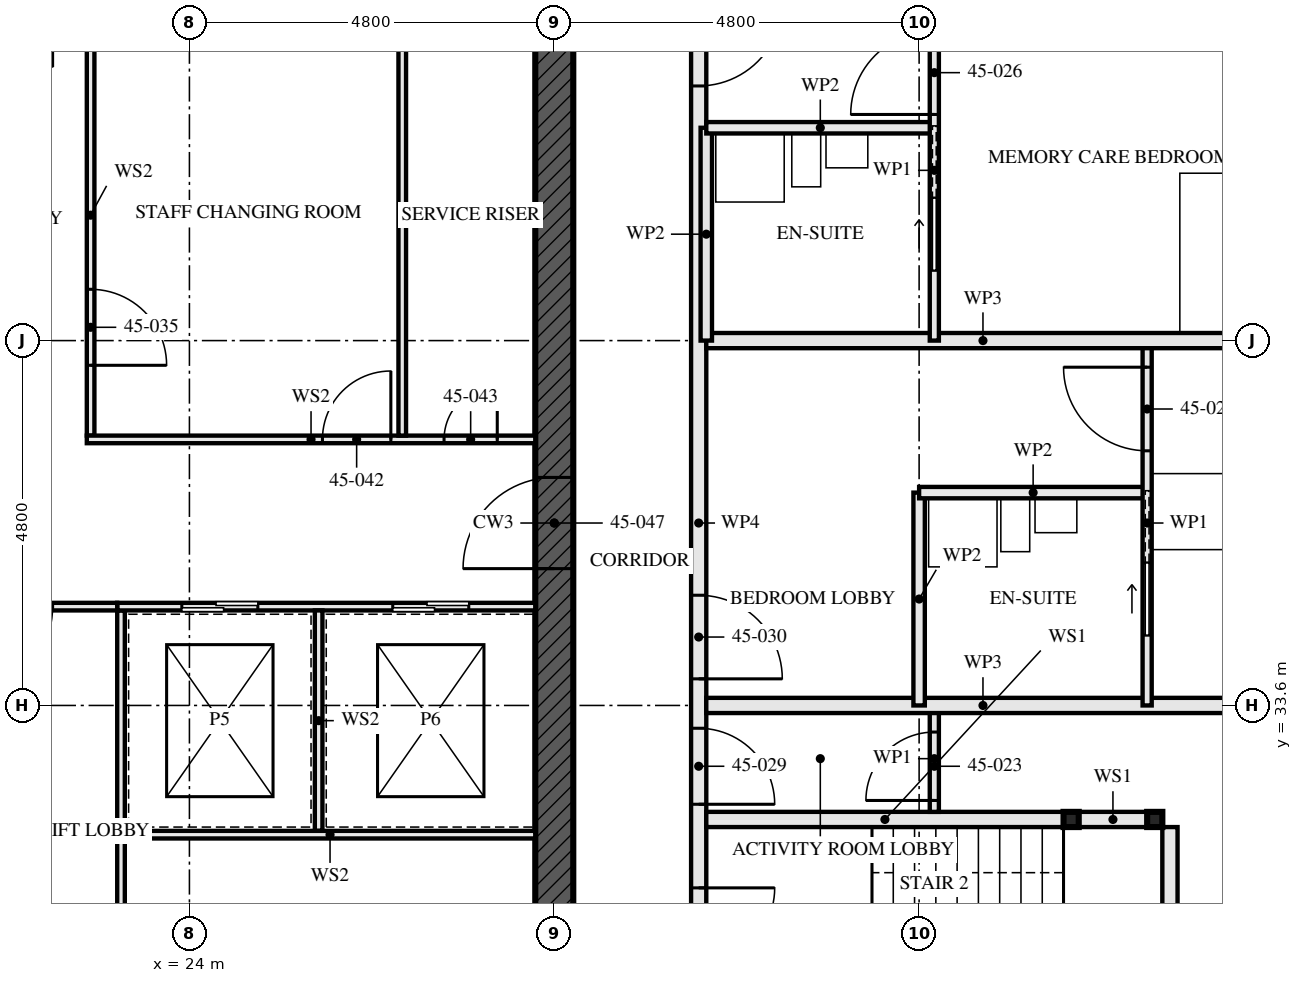
"""IFC4 building model, lengths in metres.
Left out: names, types, materials, properties, quantities, classifications, styles, units other than length and angle.
Written with IfcOpenShell. Run it as: python <this file> out.ifc"""

import sys

from ifc_helpers import new_model, si_unit, direction, frame, frame_2d, origin, origin_2d, place, context, subcontext, project, spatial, rectangle, hollow_rectangle, extrude, element, fill, save


model = new_model("IFC4")
c1 = context("Model", 3, precision=1e-05, world=origin(), true_north=direction((0.0, 1.0)))
c2 = subcontext(c1, "Body", "Model", "MODEL_VIEW")
j1 = project(units=[si_unit("LENGTHUNIT", "METRE"), si_unit("PLANEANGLEUNIT", "RADIAN")], contexts=[c1])
p1 = place(None, origin())
s1 = spatial("IfcSite", under=j1, at=p1, CompositionType="ELEMENT")
p2 = place(p1, origin())
s2 = spatial("IfcBuilding", under=s1, at=p2, CompositionType="ELEMENT")
p3 = place(p2, frame((0.0, 0.0, 165.5)))
s3 = spatial("IfcBuildingStorey", under=s2, at=p3, CompositionType="ELEMENT", Elevation=165.5)
p4 = place(p3, frame((28.8, 29.05, -0.17), z_axis=(0.0, 0.0, 1.0), x_axis=(0.0, 1.0, 0.0)))
e1 = element("IfcWall", 1, at=p4, inside=s3, PredefinedType="SHEAR", context=c2, shape_type="SweptSolid", body=[
    extrude(rectangle(XDim=13.9, YDim=0.5, at=frame_2d((6.95, 0.0))), origin(), (0.0, 0.0, 1.0), 3.5),
])
p5 = place(p4, frame((6.35, 0.0, 0.17)))
e2 = element("IfcOpeningElement", 2, at=p5, cuts=e1, PredefinedType="OPENING", context=c2, shape_type="SweptSolid", body=[
    extrude(rectangle(XDim=1.2, YDim=2.1, at=frame_2d((0.6, 1.05))), frame((0.0, 0.26, 0.0), z_axis=(0.0, -1.0, 0.0), x_axis=(1.0, 0.0, 0.0)), (0.0, 0.0, 1.0), 0.521),
])
for number, where, z_axis, x_axis in (
    (3, (36.7, 32.1, 0.0), (0.0, 0.0, 1.0), (1.0, 0.0, 0.0)),
    (4, (35.6, 32.1, 0.0), (0.0, 0.0, 1.0), (1.0, 0.0, 0.0)),
):
    element("IfcColumn", number, at=place(p3, frame(where, z_axis=z_axis, x_axis=x_axis)), inside=s3, PredefinedType="COLUMN", context=c2, shape_type="SweptSolid", body=[
        extrude(hollow_rectangle(XDim=0.2, YDim=0.2, WallThickness=0.008, at=origin_2d()), origin(), (0.0, 0.0, 1.0), 3.33),
    ])
p6 = place(p3, frame((36.6, 32.1, 0.0), z_axis=(0.0, 0.0, 1.0), x_axis=(-1.0, 0.0, 0.0)))
e5 = element("IfcWall", 5, at=p6, inside=s3, PredefinedType="SOLIDWALL", context=c2, shape_type="SweptSolid", body=[
    extrude(rectangle(XDim=0.9, YDim=0.2, at=frame_2d((0.45, 0.0))), origin(), (0.0, 0.0, 1.0), 2.99),
])
p7 = place(p3, frame((35.5, 32.1, 0.0), z_axis=(0.0, 0.0, 1.0), x_axis=(-1.0, 0.0, 0.0)))
e6 = element("IfcWall", 6, at=p7, inside=s3, PredefinedType="SOLIDWALL", context=c2, shape_type="SweptSolid", body=[
    extrude(rectangle(XDim=4.7, YDim=0.2, at=frame_2d((2.35, 0.0))), origin(), (0.0, 0.0, 1.0), 2.99),
])
p8 = place(p3, frame((36.9, 29.4, 0.0), z_axis=(0.0, 0.0, 1.0), x_axis=(0.0, 1.0, 0.0)))
e7 = element("IfcWall", 7, at=p8, inside=s3, PredefinedType="SOLIDWALL", context=c2, shape_type="SweptSolid", body=[
    extrude(rectangle(XDim=2.6, YDim=0.2, at=frame_2d((1.3, 0.0))), origin(), (0.0, 0.0, 1.0), 3.33),
])
p9 = place(p3, frame((33.8, 32.2, 0.0), z_axis=(0.0, 0.0, 1.0), x_axis=(0.0, 1.0, 0.0)))
e8 = element("IfcWall", 8, at=p9, inside=s3, PredefinedType="PARTITIONING", context=c2, shape_type="SweptSolid", body=[
    extrude(rectangle(XDim=1.4, YDim=0.12, at=frame_2d((0.7, 0.0))), origin(), (0.0, 0.0, 1.0), 3.33),
])
p10 = place(p9, frame((0.15, 0.0, 0.0)))
e9 = element("IfcOpeningElement", 9, at=p10, cuts=e8, PredefinedType="OPENING", context=c2, shape_type="SweptSolid", body=[
    extrude(rectangle(XDim=0.9, YDim=2.1, at=frame_2d((0.45, 1.05))), frame((0.0, 0.071, 0.0), z_axis=(0.0, -1.0, 0.0), x_axis=(1.0, 0.0, 0.0)), (0.0, 0.0, 1.0), 0.141),
])
p11 = place(p3, frame((38.08, 33.6, 0.0), z_axis=(0.0, 0.0, 1.0), x_axis=(-1.0, 0.0, 0.0)))
e10 = element("IfcWall", 10, at=p11, inside=s3, PredefinedType="PARTITIONING", context=c2, shape_type="SweptSolid", body=[
    extrude(rectangle(XDim=7.28, YDim=0.2, at=frame_2d((3.64, 0.0))), origin(), (0.0, 0.0, 1.0), 2.55),
])
p12 = place(p3, frame((36.6, 36.4, 0.0), z_axis=(0.0, 0.0, 1.0), x_axis=(-1.0, 0.0, 0.0)))
e11 = element("IfcWall", 11, at=p12, inside=s3, PredefinedType="PARTITIONING", context=c2, shape_type="SweptSolid", body=[
    extrude(rectangle(XDim=3.0, YDim=0.15, at=frame_2d((1.5, 0.0))), origin(), (0.0, 0.0, 1.0), 3.33),
])
p13 = place(p3, frame((33.6, 33.6, 0.0), z_axis=(0.0, 0.0, 1.0), x_axis=(0.0, 1.0, 0.0)))
e12 = element("IfcWall", 12, at=p13, inside=s3, PredefinedType="PARTITIONING", context=c2, shape_type="SweptSolid", body=[
    extrude(rectangle(XDim=2.8, YDim=0.15, at=frame_2d((1.4, 0.0))), origin(), (0.0, 0.0, 1.0), 3.33),
])
p14 = place(p3, frame((36.6, 33.6, 0.0), z_axis=(0.0, 0.0, 1.0), x_axis=(0.0, 1.0, 0.0)))
e13 = element("IfcWall", 13, at=p14, inside=s3, PredefinedType="PARTITIONING", context=c2, shape_type="SweptSolid", body=[
    extrude(rectangle(XDim=4.8, YDim=0.12, at=frame_2d((2.4, 0.0))), origin(), (0.0, 0.0, 1.0), 3.33),
])
p15 = place(p14, frame((3.35, 0.0, 0.0)))
e14 = element("IfcOpeningElement", 14, at=p15, cuts=e13, PredefinedType="OPENING", context=c2, shape_type="SweptSolid", body=[
    extrude(rectangle(XDim=1.1, YDim=2.1, at=frame_2d((0.55, 1.05))), frame((0.0, 0.071, 0.0), z_axis=(0.0, -1.0, 0.0), x_axis=(1.0, 0.0, 0.0)), (0.0, 0.0, 1.0), 0.141),
])
p16 = place(p14, frame((0.925, 0.0, 0.0)))
e15 = element("IfcOpeningElement", 15, at=p16, cuts=e13, PredefinedType="OPENING", context=c2, shape_type="SweptSolid", body=[
    extrude(rectangle(XDim=0.95, YDim=2.1, at=frame_2d((0.475, 1.05))), frame((0.0, 0.071, 0.0), z_axis=(0.0, -1.0, 0.0), x_axis=(1.0, 0.0, 0.0)), (0.0, 0.0, 1.0), 0.141),
])
p17 = place(p3, frame((38.08, 38.4, 0.0), z_axis=(0.0, 0.0, 1.0), x_axis=(-1.0, 0.0, 0.0)))
e16 = element("IfcWall", 16, at=p17, inside=s3, PredefinedType="PARTITIONING", context=c2, shape_type="SweptSolid", body=[
    extrude(rectangle(XDim=7.28, YDim=0.2, at=frame_2d((3.64, 0.0))), origin(), (0.0, 0.0, 1.0), 2.55),
])
p18 = place(p3, frame((33.8, 41.2, 0.0), z_axis=(0.0, 0.0, 1.0), x_axis=(-1.0, 0.0, 0.0)))
e17 = element("IfcWall", 17, at=p18, inside=s3, PredefinedType="PARTITIONING", context=c2, shape_type="SweptSolid", body=[
    extrude(rectangle(XDim=3.0, YDim=0.15, at=frame_2d((1.5, 0.0))), origin(), (0.0, 0.0, 1.0), 3.33),
])
p19 = place(p3, frame((30.8, 38.4, 0.0), z_axis=(0.0, 0.0, 1.0), x_axis=(0.0, 1.0, 0.0)))
e18 = element("IfcWall", 18, at=p19, inside=s3, PredefinedType="PARTITIONING", context=c2, shape_type="SweptSolid", body=[
    extrude(rectangle(XDim=2.8, YDim=0.15, at=frame_2d((1.4, 0.0))), origin(), (0.0, 0.0, 1.0), 3.33),
])
p20 = place(p3, frame((33.8, 38.4, 0.0), z_axis=(0.0, 0.0, 1.0), x_axis=(0.0, 1.0, 0.0)))
e19 = element("IfcWall", 19, at=p20, inside=s3, PredefinedType="PARTITIONING", context=c2, shape_type="SweptSolid", body=[
    extrude(rectangle(XDim=4.48, YDim=0.12, at=frame_2d((2.24, 0.0))), origin(), (0.0, 0.0, 1.0), 3.33),
])
p21 = place(p20, frame((2.975, 0.0, 0.0)))
e20 = element("IfcOpeningElement", 20, at=p21, cuts=e19, PredefinedType="OPENING", context=c2, shape_type="SweptSolid", body=[
    extrude(rectangle(XDim=1.1, YDim=2.1, at=frame_2d((0.55, 1.05))), frame((0.0, 0.071, 0.0), z_axis=(0.0, -1.0, 0.0), x_axis=(1.0, 0.0, 0.0)), (0.0, 0.0, 1.0), 0.141),
])
p22 = place(p20, frame((0.925, 0.0, 0.0)))
e21 = element("IfcOpeningElement", 21, at=p22, cuts=e19, PredefinedType="OPENING", context=c2, shape_type="SweptSolid", body=[
    extrude(rectangle(XDim=0.95, YDim=2.1, at=frame_2d((0.475, 1.05))), frame((0.0, 0.071, 0.0), z_axis=(0.0, -1.0, 0.0), x_axis=(1.0, 0.0, 0.0)), (0.0, 0.0, 1.0), 0.141),
])
p23 = place(p3, frame((30.7, 28.35, 0.0), z_axis=(0.0, 0.0, 1.0), x_axis=(0.0, 1.0, 0.0)))
e22 = element("IfcWall", 22, at=p23, inside=s3, PredefinedType="PARTITIONING", context=c2, shape_type="SweptSolid", body=[
    extrude(rectangle(XDim=15.3, YDim=0.2, at=frame_2d((7.65, 0.0))), origin(), (0.0, 0.0, 1.0), 2.32),
])
p24 = place(p23, frame((1.85, 0.0, 0.0)))
e23 = element("IfcOpeningElement", 23, at=p24, cuts=e22, PredefinedType="OPENING", context=c2, shape_type="SweptSolid", body=[
    extrude(rectangle(XDim=1.0, YDim=2.1, at=frame_2d((0.5, 1.05))), frame((0.0, 0.111, 0.0), z_axis=(0.0, -1.0, 0.0), x_axis=(1.0, 0.0, 0.0)), (0.0, 0.0, 1.0), 0.221),
])
p25 = place(p23, frame((3.95, 0.0, 0.0)))
e24 = element("IfcOpeningElement", 24, at=p25, cuts=e22, PredefinedType="OPENING", context=c2, shape_type="SweptSolid", body=[
    extrude(rectangle(XDim=1.0, YDim=2.1, at=frame_2d((0.5, 1.05))), frame((0.0, 0.111, 0.0), z_axis=(0.0, -1.0, 0.0), x_axis=(1.0, 0.0, 0.0)), (0.0, 0.0, 1.0), 0.221),
])
p26 = place(p23, frame((5.6, 0.0, 0.0)))
e25 = element("IfcOpeningElement", 25, at=p26, cuts=e22, PredefinedType="OPENING", context=c2, shape_type="SweptSolid", body=[
    extrude(rectangle(XDim=1.1, YDim=2.1, at=frame_2d((0.55, 1.05))), frame((0.0, 0.111, 0.0), z_axis=(0.0, -1.0, 0.0), x_axis=(1.0, 0.0, 0.0)), (0.0, 0.0, 1.0), 0.221),
])
p27 = place(p23, frame((13.4, 0.0, 0.0)))
e26 = element("IfcOpeningElement", 26, at=p27, cuts=e22, PredefinedType="OPENING", context=c2, shape_type="SweptSolid", body=[
    extrude(rectangle(XDim=1.1, YDim=2.1, at=frame_2d((0.55, 1.05))), frame((0.0, 0.111, 0.0), z_axis=(0.0, -1.0, 0.0), x_axis=(1.0, 0.0, 0.0)), (0.0, 0.0, 1.0), 0.221),
])
p28 = place(p3, frame((26.8, 37.15, 0.0), z_axis=(0.0, 0.0, 1.0), x_axis=(0.0, 1.0, 0.0)))
e27 = element("IfcWall", 27, at=p28, inside=s3, PredefinedType="SOLIDWALL", context=c2, shape_type="SweptSolid", body=[
    extrude(rectangle(XDim=5.8, YDim=0.1, at=frame_2d((2.9, 0.0))), origin(), (0.0, 0.0, 1.0), 3.33),
])
p29 = place(p3, frame((22.7, 37.15, 0.0), z_axis=(0.0, 0.0, 1.0), x_axis=(0.0, 1.0, 0.0)))
e28 = element("IfcWall", 28, at=p29, inside=s3, PredefinedType="SOLIDWALL", context=c2, shape_type="SweptSolid", body=[
    extrude(rectangle(XDim=5.8, YDim=0.1, at=frame_2d((2.9, 0.0))), origin(), (0.0, 0.0, 1.0), 3.33),
])
p30 = place(p29, frame((0.925, 0.0, 0.0)))
e29 = element("IfcOpeningElement", 29, at=p30, cuts=e28, PredefinedType="OPENING", context=c2, shape_type="SweptSolid", body=[
    extrude(rectangle(XDim=1.0, YDim=2.1, at=frame_2d((0.5, 1.05))), frame((0.0, 0.061, 0.0), z_axis=(0.0, -1.0, 0.0), x_axis=(1.0, 0.0, 0.0)), (0.0, 0.0, 1.0), 0.121),
])
p31 = place(p3, frame((23.1, 29.05, 0.0), z_axis=(0.0, 0.0, 1.0), x_axis=(0.0, 1.0, 0.0)))
e30 = element("IfcWall", 30, at=p31, inside=s3, PredefinedType="SOLIDWALL", context=c2, shape_type="SweptSolid", body=[
    extrude(rectangle(XDim=5.8, YDim=0.1, at=frame_2d((2.9, 0.0))), origin(), (0.0, 0.0, 1.0), 3.33),
])
p32 = place(p31, frame((1.0, 0.0, 0.0)))
e31 = element("IfcOpeningElement", 31, at=p32, cuts=e30, PredefinedType="OPENING", context=c2, shape_type="SweptSolid", body=[
    extrude(rectangle(XDim=0.7, YDim=2.1, at=frame_2d((0.35, 1.05))), frame((0.0, 0.061, 0.0), z_axis=(0.0, -1.0, 0.0), x_axis=(1.0, 0.0, 0.0)), (0.0, 0.0, 1.0), 0.121),
])
p33 = place(p3, frame((23.05, 34.9, 0.0), z_axis=(0.0, 0.0, 1.0), x_axis=(1.0, 0.0, 0.0)))
e32 = element("IfcWall", 32, at=p33, inside=s3, PredefinedType="SOLIDWALL", context=c2, shape_type="SweptSolid", body=[
    extrude(rectangle(XDim=5.5, YDim=0.1, at=frame_2d((2.75, 0.0))), origin(), (0.0, 0.0, 1.0), 3.33),
])
p34 = place(p33, frame((0.85, 0.0, 0.0)))
e33 = element("IfcOpeningElement", 33, at=p34, cuts=e32, PredefinedType="OPENING", context=c2, shape_type="SweptSolid", body=[
    extrude(rectangle(XDim=1.0, YDim=2.1, at=frame_2d((0.5, 1.05))), frame((0.0, 0.061, 0.0), z_axis=(0.0, -1.0, 0.0), x_axis=(1.0, 0.0, 0.0)), (0.0, 0.0, 1.0), 0.121),
])
p35 = place(p33, frame((3.625, 0.0, 0.0)))
e34 = element("IfcOpeningElement", 34, at=p35, cuts=e32, PredefinedType="OPENING", context=c2, shape_type="SweptSolid", body=[
    extrude(rectangle(XDim=1.0, YDim=2.1, at=frame_2d((0.5, 1.05))), frame((0.0, 0.061, 0.0), z_axis=(0.0, -1.0, 0.0), x_axis=(1.0, 0.0, 0.0)), (0.0, 0.0, 1.0), 0.121),
])
p36 = place(p3, frame((22.65, 37.1, 0.0), z_axis=(0.0, 0.0, 1.0), x_axis=(1.0, 0.0, 0.0)))
e35 = element("IfcWall", 35, at=p36, inside=s3, PredefinedType="SOLIDWALL", context=c2, shape_type="SweptSolid", body=[
    extrude(rectangle(XDim=5.9, YDim=0.1, at=frame_2d((2.95, 0.0))), origin(), (0.0, 0.0, 1.0), 3.33),
])
p37 = place(p36, frame((3.1, 0.0, 0.0)))
e36 = element("IfcOpeningElement", 36, at=p37, cuts=e35, PredefinedType="OPENING", context=c2, shape_type="SweptSolid", body=[
    extrude(rectangle(XDim=0.9, YDim=2.1, at=frame_2d((0.45, 1.05))), frame((0.0, 0.061, 0.0), z_axis=(0.0, -1.0, 0.0), x_axis=(1.0, 0.0, 0.0)), (0.0, 0.0, 1.0), 0.121),
])
p38 = place(p36, frame((4.7, 0.0, 0.0)))
e37 = element("IfcOpeningElement", 37, at=p38, cuts=e35, PredefinedType="OPENING", context=c2, shape_type="SweptSolid", body=[
    extrude(rectangle(XDim=0.7, YDim=2.1, at=frame_2d((0.35, 1.05))), frame((0.0, 0.061, 0.0), z_axis=(0.0, -1.0, 0.0), x_axis=(1.0, 0.0, 0.0)), (0.0, 0.0, 1.0), 0.121),
])
p39 = place(p3, frame((20.55, 34.9, 0.0), z_axis=(0.0, 0.0, 1.0), x_axis=(1.0, 0.0, 0.0)))
e38 = element("IfcWall", 38, at=p39, inside=s3, PredefinedType="SOLIDWALL", context=c2, shape_type="SweptSolid", body=[
    extrude(rectangle(XDim=2.5, YDim=0.1, at=frame_2d((1.25, 0.0))), origin(), (0.0, 0.0, 1.0), 3.33),
])
p40 = place(p39, frame((0.45, 0.0, 0.0)))
e39 = element("IfcOpeningElement", 39, at=p40, cuts=e38, PredefinedType="OPENING", context=c2, shape_type="SweptSolid", body=[
    extrude(rectangle(XDim=1.2, YDim=2.1, at=frame_2d((0.6, 1.05))), frame((0.0, 0.061, 0.0), z_axis=(0.0, -1.0, 0.0), x_axis=(1.0, 0.0, 0.0)), (0.0, 0.0, 1.0), 0.121),
])
p41 = place(p3, frame((25.7, 31.95, 0.0), z_axis=(0.0, 0.0, 1.0), x_axis=(0.0, 1.0, 0.0)))
e40 = element("IfcWall", 40, at=p41, inside=s3, PredefinedType="SOLIDWALL", context=c2, shape_type="SweptSolid", body=[
    extrude(rectangle(XDim=2.9, YDim=0.1, at=frame_2d((1.45, 0.0))), origin(), (0.0, 0.0, 1.0), 3.33),
])
p42 = place(p3, frame((23.15, 31.9, 0.0), z_axis=(0.0, 0.0, 1.0), x_axis=(1.0, 0.0, 0.0)))
e41 = element("IfcWall", 41, at=p42, inside=s3, PredefinedType="SOLIDWALL", context=c2, shape_type="SweptSolid", body=[
    extrude(rectangle(XDim=5.4, YDim=0.1, at=frame_2d((2.7, 0.0))), origin(), (0.0, 0.0, 1.0), 3.33),
])
p43 = place(p10, origin())
e42 = element("IfcDoor", 42, at=p43, inside=s3, OperationType="SINGLE_SWING_RIGHT", PredefinedType="DOOR", context=c2, shape_type="SweptSolid", body=[
    extrude(rectangle(XDim=0.9, YDim=2.1, at=frame_2d((0.45, 1.05))), frame((0.0, 0.022, 0.0), z_axis=(0.0, -1.0, 0.0), x_axis=(1.0, 0.0, 0.0)), (0.0, 0.0, 1.0), 0.044),
])
fill(e9, e42)
p44 = place(p15, origin())
e43 = element("IfcDoor", 43, at=p44, inside=s3, OperationType="SINGLE_SWING_LEFT", PredefinedType="DOOR", context=c2, shape_type="SweptSolid", body=[
    extrude(rectangle(XDim=1.1, YDim=2.1, at=frame_2d((0.55, 1.05))), frame((0.0, 0.022, 0.0), z_axis=(0.0, -1.0, 0.0), x_axis=(1.0, 0.0, 0.0)), (0.0, 0.0, 1.0), 0.044),
])
fill(e14, e43)
p45 = place(p16, origin())
e44 = element("IfcDoor", 44, at=p45, inside=s3, OperationType="SLIDING_TO_LEFT", PredefinedType="DOOR", context=c2, shape_type="SweptSolid", body=[
    extrude(rectangle(XDim=0.95, YDim=2.1, at=frame_2d((0.475, 1.05))), frame((0.0, 0.022, 0.0), z_axis=(0.0, -1.0, 0.0), x_axis=(1.0, 0.0, 0.0)), (0.0, 0.0, 1.0), 0.044),
])
fill(e15, e44)
p46 = place(p21, origin())
e45 = element("IfcDoor", 45, at=p46, inside=s3, OperationType="SINGLE_SWING_RIGHT", PredefinedType="DOOR", context=c2, shape_type="SweptSolid", body=[
    extrude(rectangle(XDim=1.1, YDim=2.1, at=frame_2d((0.55, 1.05))), frame((0.0, 0.022, 0.0), z_axis=(0.0, -1.0, 0.0), x_axis=(1.0, 0.0, 0.0)), (0.0, 0.0, 1.0), 0.044),
])
fill(e20, e45)
p47 = place(p22, origin())
e46 = element("IfcDoor", 46, at=p47, inside=s3, OperationType="SLIDING_TO_LEFT", PredefinedType="DOOR", context=c2, shape_type="SweptSolid", body=[
    extrude(rectangle(XDim=0.95, YDim=2.1, at=frame_2d((0.475, 1.05))), frame((0.0, 0.022, 0.0), z_axis=(0.0, -1.0, 0.0), x_axis=(1.0, 0.0, 0.0)), (0.0, 0.0, 1.0), 0.044),
])
fill(e21, e46)
p48 = place(p24, frame((1.0, 0.0, 0.0), z_axis=(0.0, 0.0, 1.0), x_axis=(-1.0, 0.0, 0.0)))
e47 = element("IfcDoor", 47, at=p48, inside=s3, OperationType="SINGLE_SWING_RIGHT", PredefinedType="DOOR", context=c2, shape_type="SweptSolid", body=[
    extrude(rectangle(XDim=1.0, YDim=2.1, at=frame_2d((0.5, 1.05))), frame((0.0, 0.032, 0.0), z_axis=(0.0, -1.0, 0.0), x_axis=(1.0, 0.0, 0.0)), (0.0, 0.0, 1.0), 0.064),
])
fill(e23, e47)
p49 = place(p25, frame((1.0, 0.0, 0.0), z_axis=(0.0, 0.0, 1.0), x_axis=(-1.0, 0.0, 0.0)))
e48 = element("IfcDoor", 48, at=p49, inside=s3, OperationType="SINGLE_SWING_LEFT", PredefinedType="DOOR", context=c2, shape_type="SweptSolid", body=[
    extrude(rectangle(XDim=1.0, YDim=2.1, at=frame_2d((0.5, 1.05))), frame((0.0, 0.027, 0.0), z_axis=(0.0, -1.0, 0.0), x_axis=(1.0, 0.0, 0.0)), (0.0, 0.0, 1.0), 0.054),
])
fill(e24, e48)
p50 = place(p26, frame((1.1, 0.0, 0.0), z_axis=(0.0, 0.0, 1.0), x_axis=(-1.0, 0.0, 0.0)))
e49 = element("IfcDoor", 49, at=p50, inside=s3, OperationType="SINGLE_SWING_LEFT", PredefinedType="DOOR", context=c2, shape_type="SweptSolid", body=[
    extrude(rectangle(XDim=1.1, YDim=2.1, at=frame_2d((0.55, 1.05))), frame((0.0, 0.027, 0.0), z_axis=(0.0, -1.0, 0.0), x_axis=(1.0, 0.0, 0.0)), (0.0, 0.0, 1.0), 0.054),
])
fill(e25, e49)
p51 = place(p27, frame((1.1, 0.0, 0.0), z_axis=(0.0, 0.0, 1.0), x_axis=(-1.0, 0.0, 0.0)))
e50 = element("IfcDoor", 50, at=p51, inside=s3, OperationType="SINGLE_SWING_RIGHT", PredefinedType="DOOR", context=c2, shape_type="SweptSolid", body=[
    extrude(rectangle(XDim=1.1, YDim=2.1, at=frame_2d((0.55, 1.05))), frame((0.0, 0.027, 0.0), z_axis=(0.0, -1.0, 0.0), x_axis=(1.0, 0.0, 0.0)), (0.0, 0.0, 1.0), 0.054),
])
fill(e26, e50)
p52 = place(p30, frame((1.0, 0.0, 0.0), z_axis=(0.0, 0.0, 1.0), x_axis=(-1.0, 0.0, 0.0)))
e51 = element("IfcDoor", 51, at=p52, inside=s3, OperationType="SINGLE_SWING_LEFT", PredefinedType="DOOR", context=c2, shape_type="SweptSolid", body=[
    extrude(rectangle(XDim=1.0, YDim=2.1, at=frame_2d((0.5, 1.05))), frame((0.0, 0.027, 0.0), z_axis=(0.0, -1.0, 0.0), x_axis=(1.0, 0.0, 0.0)), (0.0, 0.0, 1.0), 0.054),
])
fill(e29, e51)
p53 = place(p34, origin())
e52 = element("IfcDoor", 52, at=p53, inside=s3, OperationType="SLIDING_TO_LEFT", PredefinedType="DOOR", context=c2, shape_type="SweptSolid", body=[
    extrude(rectangle(XDim=1.0, YDim=2.1, at=frame_2d((0.5, 1.05))), frame((0.0, 0.05, 0.0), z_axis=(0.0, -1.0, 0.0), x_axis=(1.0, 0.0, 0.0)), (0.0, 0.0, 1.0), 0.1),
])
fill(e33, e52)
p54 = place(p35, origin())
e53 = element("IfcDoor", 53, at=p54, inside=s3, OperationType="SLIDING_TO_LEFT", PredefinedType="DOOR", context=c2, shape_type="SweptSolid", body=[
    extrude(rectangle(XDim=1.0, YDim=2.1, at=frame_2d((0.5, 1.05))), frame((0.0, 0.05, 0.0), z_axis=(0.0, -1.0, 0.0), x_axis=(1.0, 0.0, 0.0)), (0.0, 0.0, 1.0), 0.1),
])
fill(e34, e53)
p55 = place(p37, origin())
e54 = element("IfcDoor", 54, at=p55, inside=s3, OperationType="SINGLE_SWING_LEFT", PredefinedType="DOOR", context=c2, shape_type="SweptSolid", body=[
    extrude(rectangle(XDim=0.9, YDim=2.1, at=frame_2d((0.45, 1.05))), frame((0.0, 0.027, 0.0), z_axis=(0.0, -1.0, 0.0), x_axis=(1.0, 0.0, 0.0)), (0.0, 0.0, 1.0), 0.054),
])
fill(e36, e54)
p56 = place(p38, origin())
e55 = element("IfcDoor", 55, at=p56, inside=s3, OperationType="SINGLE_SWING_LEFT", PredefinedType="DOOR", context=c2, shape_type="SweptSolid", body=[
    extrude(rectangle(XDim=0.7, YDim=2.1, at=frame_2d((0.35, 1.05))), frame((0.0, 0.027, 0.0), z_axis=(0.0, -1.0, 0.0), x_axis=(1.0, 0.0, 0.0)), (0.0, 0.0, 1.0), 0.054),
])
fill(e37, e55)
p57 = place(p5, origin())
e56 = element("IfcDoor", 56, at=p57, inside=s3, OperationType="SINGLE_SWING_LEFT", PredefinedType="DOOR", context=c2, shape_type="SweptSolid", body=[
    extrude(rectangle(XDim=1.2, YDim=2.1, at=frame_2d((0.6, 1.05))), frame((0.0, 0.027, 0.0), z_axis=(0.0, -1.0, 0.0), x_axis=(1.0, 0.0, 0.0)), (0.0, 0.0, 1.0), 0.054),
])
fill(e2, e56)
save(model, sys.argv[1])
